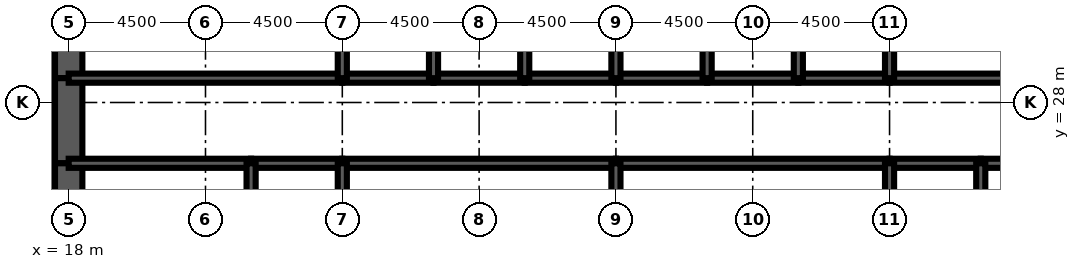
"""IFC4 building model, lengths in metres.
Left out: names, types, materials, properties, quantities, classifications, styles, units other than length and angle.
Written with IfcOpenShell. Run it as: python <this file> out.ifc"""

import sys

from ifc_helpers import new_model, si_unit, direction, frame, frame_2d, origin, place, context, subcontext, project, spatial, rectangle, extrude, element, fill, save


model = new_model("IFC4")
c1 = context("Model", 3, precision=1e-05, world=origin(), true_north=direction((0.0, 1.0)))
c2 = subcontext(c1, "Body", "Model", "MODEL_VIEW")
j1 = project(units=[si_unit("LENGTHUNIT", "METRE"), si_unit("PLANEANGLEUNIT", "RADIAN")], contexts=[c1])
p1 = place(None, origin())
s1 = spatial("IfcSite", under=j1, at=p1, CompositionType="ELEMENT")
p2 = place(p1, origin())
s2 = spatial("IfcBuilding", under=s1, at=p2, CompositionType="ELEMENT")
p3 = place(p2, frame((0.0, 0.0, 90.5)))
s3 = spatial("IfcBuildingStorey", under=s2, at=p3, CompositionType="ELEMENT", Elevation=90.5)
p4 = place(p3, frame((18.0, 32.0, 0.0), z_axis=(0.0, 0.0, 1.0), x_axis=(0.0, -1.0, 0.0)))
e1 = element("IfcWall", 1, at=p4, inside=s3, PredefinedType="SHEAR", context=c2, shape_type="SweptSolid", body=[
    extrude(rectangle(XDim=3.2, YDim=0.9, at=frame_2d((1.6, 0.0))), origin(), (0.0, 0.0, 1.0), 4.5),
])
p5 = place(p3, frame((18.0, 28.8, 0.0), z_axis=(0.0, 0.0, 1.0), x_axis=(0.0, -1.0, 0.0)))
e2 = element("IfcWall", 2, at=p5, inside=s3, PredefinedType="SHEAR", context=c2, shape_type="SweptSolid", body=[
    extrude(rectangle(XDim=2.8, YDim=0.9, at=frame_2d((1.4, 0.0))), origin(), (0.0, 0.0, 1.0), 4.5),
])
p6 = place(p5, frame((0.4, 0.0, 0.0)))
e3 = element("IfcOpeningElement", 3, at=p6, cuts=e2, PredefinedType="OPENING", context=c2, shape_type="SweptSolid", body=[
    extrude(rectangle(XDim=1.8, YDim=2.1, at=frame_2d((0.9, 1.05))), frame((0.0, 0.46, 0.0), z_axis=(0.0, -1.0, 0.0), x_axis=(1.0, 0.0, 0.0)), (0.0, 0.0, 1.0), 0.92),
])
p7 = place(p3, frame((18.0, 26.0, 0.0), z_axis=(0.0, 0.0, 1.0), x_axis=(0.0, -1.0, 0.0)))
e4 = element("IfcWall", 4, at=p7, inside=s3, PredefinedType="SHEAR", context=c2, shape_type="SweptSolid", body=[
    extrude(rectangle(XDim=4.0, YDim=0.9, at=frame_2d((2.0, 0.0))), origin(), (0.0, 0.0, 1.0), 4.5),
])
p8 = place(p3, frame((18.0, 28.8, 0.0), z_axis=(0.0, 0.0, 1.0), x_axis=(1.0, 0.0, 0.0)))
e5 = element("IfcWall", 5, at=p8, inside=s3, PredefinedType="SOLIDWALL", context=c2, shape_type="SweptSolid", body=[
    extrude(rectangle(XDim=9.0, YDim=0.3, at=frame_2d((4.5, 0.0))), origin(), (0.0, 0.0, 1.0), 4.5),
])
p9 = place(p8, frame((0.65, 0.0, 0.0)))
e6 = element("IfcOpeningElement", 6, at=p9, cuts=e5, PredefinedType="OPENING", context=c2, shape_type="SweptSolid", body=[
    extrude(rectangle(XDim=1.0, YDim=2.1, at=frame_2d((0.5, 1.05))), frame((0.0, 0.16, 0.0), z_axis=(0.0, -1.0, 0.0), x_axis=(1.0, 0.0, 0.0)), (0.0, 0.0, 1.0), 0.32),
])
p10 = place(p3, frame((27.0, 28.8, 0.0), z_axis=(0.0, 0.0, 1.0), x_axis=(1.0, 0.0, 0.0)))
e7 = element("IfcWall", 7, at=p10, inside=s3, PredefinedType="SOLIDWALL", context=c2, shape_type="SweptSolid", body=[
    extrude(rectangle(XDim=3.0, YDim=0.3, at=frame_2d((1.5, 0.0))), origin(), (0.0, 0.0, 1.0), 4.5),
])
p11 = place(p10, frame((0.95, 0.0, 0.0)))
e8 = element("IfcOpeningElement", 8, at=p11, cuts=e7, PredefinedType="OPENING", context=c2, shape_type="SweptSolid", body=[
    extrude(rectangle(XDim=1.1, YDim=2.2, at=frame_2d((0.55, 1.1))), frame((0.0, 0.16, 0.0), z_axis=(0.0, -1.0, 0.0), x_axis=(1.0, 0.0, 0.0)), (0.0, 0.0, 1.0), 0.32),
])
p12 = place(p3, frame((30.0, 28.8, 0.0), z_axis=(0.0, 0.0, 1.0), x_axis=(1.0, 0.0, 0.0)))
e9 = element("IfcWall", 9, at=p12, inside=s3, PredefinedType="SOLIDWALL", context=c2, shape_type="SweptSolid", body=[
    extrude(rectangle(XDim=3.0, YDim=0.3, at=frame_2d((1.5, 0.0))), origin(), (0.0, 0.0, 1.0), 4.5),
])
p13 = place(p12, frame((0.95, 0.0, 0.0)))
e10 = element("IfcOpeningElement", 10, at=p13, cuts=e9, PredefinedType="OPENING", context=c2, shape_type="SweptSolid", body=[
    extrude(rectangle(XDim=1.1, YDim=2.2, at=frame_2d((0.55, 1.1))), frame((0.0, 0.16, 0.0), z_axis=(0.0, -1.0, 0.0), x_axis=(1.0, 0.0, 0.0)), (0.0, 0.0, 1.0), 0.32),
])
p14 = place(p3, frame((33.0, 28.8, 0.0), z_axis=(0.0, 0.0, 1.0), x_axis=(1.0, 0.0, 0.0)))
e11 = element("IfcWall", 11, at=p14, inside=s3, PredefinedType="SOLIDWALL", context=c2, shape_type="SweptSolid", body=[
    extrude(rectangle(XDim=3.0, YDim=0.3, at=frame_2d((1.5, 0.0))), origin(), (0.0, 0.0, 1.0), 4.5),
])
p15 = place(p14, frame((0.95, 0.0, 0.0)))
e12 = element("IfcOpeningElement", 12, at=p15, cuts=e11, PredefinedType="OPENING", context=c2, shape_type="SweptSolid", body=[
    extrude(rectangle(XDim=1.1, YDim=2.2, at=frame_2d((0.55, 1.1))), frame((0.0, 0.16, 0.0), z_axis=(0.0, -1.0, 0.0), x_axis=(1.0, 0.0, 0.0)), (0.0, 0.0, 1.0), 0.32),
])
for number, where, z_axis, x_axis in (
    (13, (36.0, 28.8, 0.0), (0.0, 0.0, 1.0), (1.0, 0.0, 0.0)),
    (14, (39.0, 28.8, 0.0), (0.0, 0.0, 1.0), (1.0, 0.0, 0.0)),
):
    element("IfcWall", number, at=place(p3, frame(where, z_axis=z_axis, x_axis=x_axis)), inside=s3, PredefinedType="SOLIDWALL", context=c2, shape_type="SweptSolid", body=[
        extrude(rectangle(XDim=3.0, YDim=0.3, at=frame_2d((1.5, 0.0))), origin(), (0.0, 0.0, 1.0), 4.5),
    ])
p16 = place(p3, frame((42.0, 28.8, 0.0), z_axis=(0.0, 0.0, 1.0), x_axis=(1.0, 0.0, 0.0)))
e15 = element("IfcWall", 15, at=p16, inside=s3, PredefinedType="SOLIDWALL", context=c2, shape_type="SweptSolid", body=[
    extrude(rectangle(XDim=3.0, YDim=0.3, at=frame_2d((1.5, 0.0))), origin(), (0.0, 0.0, 1.0), 4.5),
])
p17 = place(p16, frame((0.95, 0.0, 0.0)))
e16 = element("IfcOpeningElement", 16, at=p17, cuts=e15, PredefinedType="OPENING", context=c2, shape_type="SweptSolid", body=[
    extrude(rectangle(XDim=1.1, YDim=2.2, at=frame_2d((0.55, 1.1))), frame((0.0, 0.16, 0.0), z_axis=(0.0, -1.0, 0.0), x_axis=(1.0, 0.0, 0.0)), (0.0, 0.0, 1.0), 0.32),
])
p18 = place(p3, frame((45.0, 28.8, 0.0), z_axis=(0.0, 0.0, 1.0), x_axis=(1.0, 0.0, 0.0)))
e17 = element("IfcWall", 17, at=p18, inside=s3, PredefinedType="SOLIDWALL", context=c2, shape_type="SweptSolid", body=[
    extrude(rectangle(XDim=9.0, YDim=0.3, at=frame_2d((4.5, 0.0))), origin(), (0.0, 0.0, 1.0), 4.5),
])
p19 = place(p18, frame((7.35, 0.0, 0.0)))
e18 = element("IfcOpeningElement", 18, at=p19, cuts=e17, PredefinedType="OPENING", context=c2, shape_type="SweptSolid", body=[
    extrude(rectangle(XDim=1.0, YDim=2.1, at=frame_2d((0.5, 1.05))), frame((0.0, 0.16, 0.0), z_axis=(0.0, -1.0, 0.0), x_axis=(1.0, 0.0, 0.0)), (0.0, 0.0, 1.0), 0.32),
])
p20 = place(p3, frame((18.0, 26.0, 0.0), z_axis=(0.0, 0.0, 1.0), x_axis=(1.0, 0.0, 0.0)))
e19 = element("IfcWall", 19, at=p20, inside=s3, PredefinedType="SOLIDWALL", context=c2, shape_type="SweptSolid", body=[
    extrude(rectangle(XDim=6.0, YDim=0.3, at=frame_2d((3.0, 0.0))), origin(), (0.0, 0.0, 1.0), 4.5),
])
p21 = place(p3, frame((24.0, 26.0, 0.0), z_axis=(0.0, 0.0, 1.0), x_axis=(1.0, 0.0, 0.0)))
e20 = element("IfcWall", 20, at=p21, inside=s3, PredefinedType="SOLIDWALL", context=c2, shape_type="SweptSolid", body=[
    extrude(rectangle(XDim=3.0, YDim=0.3, at=frame_2d((1.5, 0.0))), origin(), (0.0, 0.0, 1.0), 4.5),
])
for number, where, z_axis, x_axis in (
    (21, (27.0, 26.0, 0.0), (0.0, 0.0, 1.0), (1.0, 0.0, 0.0)),
    (22, (36.0, 26.0, 0.0), (0.0, 0.0, 1.0), (1.0, 0.0, 0.0)),
):
    element("IfcWall", number, at=place(p3, frame(where, z_axis=z_axis, x_axis=x_axis)), inside=s3, PredefinedType="SOLIDWALL", context=c2, shape_type="SweptSolid", body=[
        extrude(rectangle(XDim=9.0, YDim=0.3, at=frame_2d((4.5, 0.0))), origin(), (0.0, 0.0, 1.0), 4.5),
    ])
p22 = place(p3, frame((45.0, 26.0, 0.0), z_axis=(0.0, 0.0, 1.0), x_axis=(1.0, 0.0, 0.0)))
e23 = element("IfcWall", 23, at=p22, inside=s3, PredefinedType="SOLIDWALL", context=c2, shape_type="SweptSolid", body=[
    extrude(rectangle(XDim=3.0, YDim=0.3, at=frame_2d((1.5, 0.0))), origin(), (0.0, 0.0, 1.0), 4.5),
])
p23 = place(p3, frame((48.0, 26.0, 0.0), z_axis=(0.0, 0.0, 1.0), x_axis=(1.0, 0.0, 0.0)))
e24 = element("IfcWall", 24, at=p23, inside=s3, PredefinedType="SOLIDWALL", context=c2, shape_type="SweptSolid", body=[
    extrude(rectangle(XDim=6.0, YDim=0.3, at=frame_2d((3.0, 0.0))), origin(), (0.0, 0.0, 1.0), 4.5),
])
for number, where, z_axis, x_axis in (
    (25, (27.0, 28.8, 0.0), (0.0, 0.0, 1.0), (0.0, 1.0, 0.0)),
    (26, (30.0, 28.8, 0.0), (0.0, 0.0, 1.0), (0.0, 1.0, 0.0)),
    (27, (33.0, 28.8, 0.0), (0.0, 0.0, 1.0), (0.0, 1.0, 0.0)),
    (28, (36.0, 28.8, 0.0), (0.0, 0.0, 1.0), (0.0, 1.0, 0.0)),
    (29, (39.0, 28.8, 0.0), (0.0, 0.0, 1.0), (0.0, 1.0, 0.0)),
    (30, (42.0, 28.8, 0.0), (0.0, 0.0, 1.0), (0.0, 1.0, 0.0)),
    (31, (45.0, 28.8, 0.0), (0.0, 0.0, 1.0), (0.0, 1.0, 0.0)),
):
    element("IfcWall", number, at=place(p3, frame(where, z_axis=z_axis, x_axis=x_axis)), inside=s3, PredefinedType="SOLIDWALL", context=c2, shape_type="SweptSolid", body=[
        extrude(rectangle(XDim=3.2, YDim=0.3, at=frame_2d((1.6, 0.0))), origin(), (0.0, 0.0, 1.0), 4.5),
    ])
for number, where, z_axis, x_axis in (
    (32, (24.0, 22.0, 0.0), (0.0, 0.0, 1.0), (0.0, 1.0, 0.0)),
    (33, (27.0, 22.0, 0.0), (0.0, 0.0, 1.0), (0.0, 1.0, 0.0)),
    (34, (36.0, 22.0, 0.0), (0.0, 0.0, 1.0), (0.0, 1.0, 0.0)),
    (35, (45.0, 22.0, 0.0), (0.0, 0.0, 1.0), (0.0, 1.0, 0.0)),
    (36, (48.0, 22.0, 0.0), (0.0, 0.0, 1.0), (0.0, 1.0, 0.0)),
):
    element("IfcWall", number, at=place(p3, frame(where, z_axis=z_axis, x_axis=x_axis)), inside=s3, PredefinedType="SOLIDWALL", context=c2, shape_type="SweptSolid", body=[
        extrude(rectangle(XDim=4.0, YDim=0.3, at=frame_2d((2.0, 0.0))), origin(), (0.0, 0.0, 1.0), 4.5),
    ])
p24 = place(p3, frame((38.5, 22.15, 0.0), z_axis=(0.0, 0.0, 1.0), x_axis=(0.0, 1.0, 0.0)))
e37 = element("IfcWall", 37, at=p24, inside=s3, PredefinedType="PARTITIONING", context=c2, shape_type="SweptSolid", body=[
    extrude(rectangle(XDim=3.7, YDim=0.15, at=frame_2d((1.85, 0.0))), origin(), (0.0, 0.0, 1.0), 3.0),
])
p25 = place(p24, frame((2.2, 0.0, 0.0)))
e38 = element("IfcOpeningElement", 38, at=p25, cuts=e37, PredefinedType="OPENING", context=c2, shape_type="SweptSolid", body=[
    extrude(rectangle(XDim=1.0, YDim=2.1, at=frame_2d((0.5, 1.05))), frame((0.0, 0.085, 0.0), z_axis=(0.0, -1.0, 0.0), x_axis=(1.0, 0.0, 0.0)), (0.0, 0.0, 1.0), 0.17),
])
p26 = place(p3, frame((20.625, 22.15, 0.0), z_axis=(0.0, 0.0, 1.0), x_axis=(0.0, 1.0, 0.0)))
e39 = element("IfcWall", 39, at=p26, inside=s3, PredefinedType="PARTITIONING", context=c2, shape_type="SweptSolid", body=[
    extrude(rectangle(XDim=3.7, YDim=0.15, at=frame_2d((1.85, 0.0))), origin(), (0.0, 0.0, 1.0), 3.0),
])
p27 = place(p3, frame((47.7, 26.15, 0.0), z_axis=(0.0, 0.0, 1.0), x_axis=(0.0, 1.0, 0.0)))
e40 = element("IfcWall", 40, at=p27, inside=s3, PredefinedType="PARTITIONING", context=c2, shape_type="SweptSolid", body=[
    extrude(rectangle(XDim=2.5, YDim=0.15, at=frame_2d((1.25, 0.0))), origin(), (0.0, 0.0, 1.0), 3.0),
])
p28 = place(p27, frame((1.15, 0.0, 0.0)))
e41 = element("IfcOpeningElement", 41, at=p28, cuts=e40, PredefinedType="OPENING", context=c2, shape_type="SweptSolid", body=[
    extrude(rectangle(XDim=1.0, YDim=2.1, at=frame_2d((0.5, 1.05))), frame((0.0, 0.085, 0.0), z_axis=(0.0, -1.0, 0.0), x_axis=(1.0, 0.0, 0.0)), (0.0, 0.0, 1.0), 0.17),
])
p29 = place(p25, origin())
e42 = element("IfcDoor", 42, at=p29, inside=s3, OperationType="SINGLE_SWING_RIGHT", PredefinedType="DOOR", context=c2, shape_type="SweptSolid", body=[
    extrude(rectangle(XDim=1.0, YDim=2.1, at=frame_2d((0.5, 1.05))), frame((0.0, 0.025, 0.0), z_axis=(0.0, -1.0, 0.0), x_axis=(1.0, 0.0, 0.0)), (0.0, 0.0, 1.0), 0.05),
])
fill(e38, e42)
p30 = place(p28, origin())
e43 = element("IfcDoor", 43, at=p30, inside=s3, OperationType="SINGLE_SWING_RIGHT", PredefinedType="DOOR", context=c2, shape_type="SweptSolid", body=[
    extrude(rectangle(XDim=1.0, YDim=2.1, at=frame_2d((0.5, 1.05))), frame((0.0, 0.025, 0.0), z_axis=(0.0, -1.0, 0.0), x_axis=(1.0, 0.0, 0.0)), (0.0, 0.0, 1.0), 0.05),
])
fill(e41, e43)
p31 = place(p17, origin())
e44 = element("IfcDoor", 44, at=p31, inside=s3, OperationType="DOUBLE_DOOR_SLIDING", PredefinedType="USERDEFINED", context=c2, shape_type="SweptSolid", body=[
    extrude(rectangle(XDim=1.1, YDim=2.2, at=frame_2d((0.55, 1.1))), frame((0.0, 0.025, 0.0), z_axis=(0.0, -1.0, 0.0), x_axis=(1.0, 0.0, 0.0)), (0.0, 0.0, 1.0), 0.05),
])
fill(e16, e44)
p32 = place(p11, origin())
e45 = element("IfcDoor", 45, at=p32, inside=s3, OperationType="DOUBLE_DOOR_SLIDING", PredefinedType="USERDEFINED", context=c2, shape_type="SweptSolid", body=[
    extrude(rectangle(XDim=1.1, YDim=2.2, at=frame_2d((0.55, 1.1))), frame((0.0, 0.025, 0.0), z_axis=(0.0, -1.0, 0.0), x_axis=(1.0, 0.0, 0.0)), (0.0, 0.0, 1.0), 0.05),
])
fill(e8, e45)
p33 = place(p13, origin())
e46 = element("IfcDoor", 46, at=p33, inside=s3, OperationType="DOUBLE_DOOR_SLIDING", PredefinedType="USERDEFINED", context=c2, shape_type="SweptSolid", body=[
    extrude(rectangle(XDim=1.1, YDim=2.2, at=frame_2d((0.55, 1.1))), frame((0.0, 0.025, 0.0), z_axis=(0.0, -1.0, 0.0), x_axis=(1.0, 0.0, 0.0)), (0.0, 0.0, 1.0), 0.05),
])
fill(e10, e46)
p34 = place(p15, origin())
e47 = element("IfcDoor", 47, at=p34, inside=s3, OperationType="DOUBLE_DOOR_SLIDING", PredefinedType="USERDEFINED", context=c2, shape_type="SweptSolid", body=[
    extrude(rectangle(XDim=1.1, YDim=2.2, at=frame_2d((0.55, 1.1))), frame((0.0, 0.025, 0.0), z_axis=(0.0, -1.0, 0.0), x_axis=(1.0, 0.0, 0.0)), (0.0, 0.0, 1.0), 0.05),
])
fill(e12, e47)
p35 = place(p9, origin())
e48 = element("IfcDoor", 48, at=p35, inside=s3, OperationType="SINGLE_SWING_LEFT", PredefinedType="DOOR", context=c2, shape_type="SweptSolid", body=[
    extrude(rectangle(XDim=1.0, YDim=2.1, at=frame_2d((0.5, 1.05))), frame((0.0, 0.025, 0.0), z_axis=(0.0, -1.0, 0.0), x_axis=(1.0, 0.0, 0.0)), (0.0, 0.0, 1.0), 0.05),
])
fill(e6, e48)
p36 = place(p6, origin())
e49 = element("IfcDoor", 49, at=p36, inside=s3, OperationType="SINGLE_SWING_LEFT", PredefinedType="DOOR", context=c2, shape_type="SweptSolid", body=[
    extrude(rectangle(XDim=1.8, YDim=2.1, at=frame_2d((0.9, 1.05))), frame((0.0, 0.45, 0.0), z_axis=(0.0, -1.0, 0.0), x_axis=(1.0, 0.0, 0.0)), (0.0, 0.0, 1.0), 0.899),
])
fill(e3, e49)
save(model, sys.argv[1])
